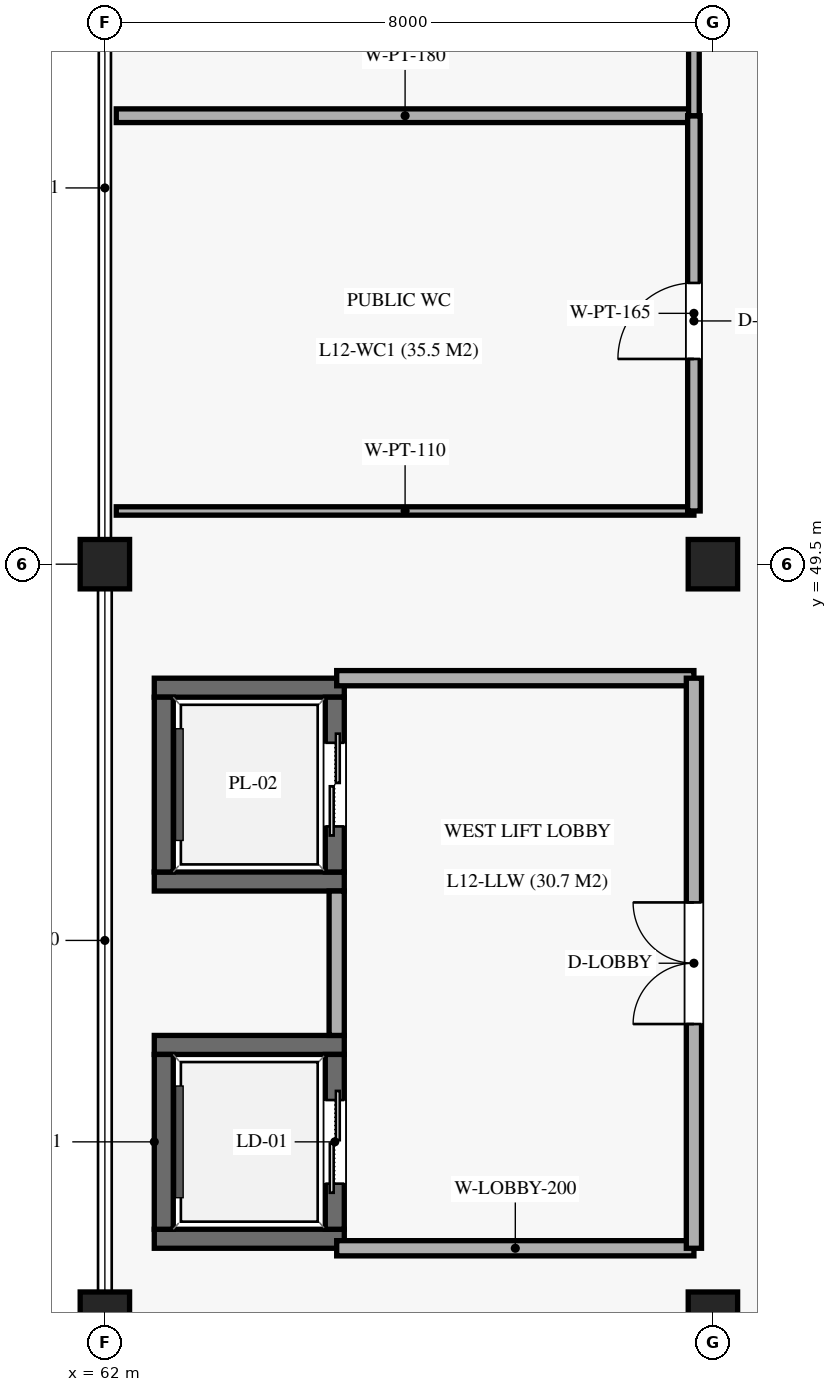
"""IFC4 building model, lengths in metres.
Left out: names, types, materials, properties, quantities, classifications, styles, units other than length and angle.
Written with IfcOpenShell. Run it as: python <this file> out.ifc"""

import sys

from ifc_helpers import new_model, si_unit, direction, frame, frame_2d, origin, origin_2d, place, context, subcontext, project, spatial, rectangle, extrude, element, fill, save


model = new_model("IFC4")
c1 = context("Model", 3, precision=1e-05, world=origin(), true_north=direction((0.0, 1.0)))
c2 = subcontext(c1, "Body", "Model", "MODEL_VIEW")
j1 = project(units=[si_unit("LENGTHUNIT", "METRE"), si_unit("PLANEANGLEUNIT", "RADIAN")], contexts=[c1])
p1 = place(None, origin())
s1 = spatial("IfcSite", under=j1, at=p1, CompositionType="ELEMENT")
p2 = place(p1, origin())
s2 = spatial("IfcBuilding", under=s1, at=p2, CompositionType="ELEMENT")
p3 = place(p2, frame((0.0, 0.0, 62.22)))
s3 = spatial("IfcBuildingStorey", under=s2, at=p3, CompositionType="ELEMENT", Elevation=62.22)
for number, where, z_axis, x_axis in (
    (1, (62.0, 39.6, 0.0), (0.0, 0.0, 1.0), (1.0, 0.0, 0.0)),
    (2, (62.0, 49.5, 0.0), (0.0, 0.0, 1.0), (1.0, 0.0, 0.0)),
    (3, (70.0, 39.6, 0.0), (0.0, 0.0, 1.0), (1.0, 0.0, 0.0)),
    (4, (70.0, 49.5, 0.0), (0.0, 0.0, 1.0), (1.0, 0.0, 0.0)),
):
    element("IfcColumn", number, at=place(p3, frame(where, z_axis=z_axis, x_axis=x_axis)), inside=s3, PredefinedType="COLUMN", context=c2, shape_type="SweptSolid", body=[
        extrude(rectangle(XDim=0.65, YDim=0.65, at=origin_2d()), origin(), (0.0, 0.0, 1.0), 4.08),
    ])
for number, where, z_axis, x_axis in (
    (5, (62.65, 40.625, 0.0), (0.0, 0.0, 1.0), (1.0, 0.0, 0.0)),
    (6, (62.65, 43.175, 0.0), (0.0, 0.0, 1.0), (1.0, 0.0, 0.0)),
):
    element("IfcWall", number, at=place(p3, frame(where, z_axis=z_axis, x_axis=x_axis)), inside=s3, PredefinedType="SOLIDWALL", context=c2, shape_type="SweptSolid", body=[
        extrude(rectangle(XDim=2.5, YDim=0.25, at=frame_2d((1.25, 0.0))), origin(), (0.0, 0.0, 1.0), 3.83),
    ])
p4 = place(p3, frame((62.775, 40.75, 0.0), z_axis=(0.0, 0.0, 1.0), x_axis=(0.0, 1.0, 0.0)))
e7 = element("IfcWall", 7, at=p4, inside=s3, PredefinedType="SOLIDWALL", context=c2, shape_type="SweptSolid", body=[
    extrude(rectangle(XDim=2.3, YDim=0.25, at=frame_2d((1.15, 0.0))), origin(), (0.0, 0.0, 1.0), 3.83),
])
p5 = place(p3, frame((65.025, 40.75, 0.0), z_axis=(0.0, 0.0, 1.0), x_axis=(0.0, 1.0, 0.0)))
e8 = element("IfcWall", 8, at=p5, inside=s3, PredefinedType="SOLIDWALL", context=c2, shape_type="SweptSolid", body=[
    extrude(rectangle(XDim=2.3, YDim=0.25, at=frame_2d((1.15, 0.0))), origin(), (0.0, 0.0, 1.0), 3.83),
])
p6 = place(p5, frame((0.6, 0.0, 0.0)))
e9 = element("IfcOpeningElement", 9, at=p6, cuts=e8, PredefinedType="OPENING", context=c2, shape_type="SweptSolid", body=[
    extrude(rectangle(XDim=1.1, YDim=2.2, at=frame_2d((0.55, 1.1))), frame((0.0, 0.135, 0.0), z_axis=(0.0, -1.0, 0.0), x_axis=(1.0, 0.0, 0.0)), (0.0, 0.0, 1.0), 0.27),
])
for number, where, z_axis, x_axis in (
    (10, (62.65, 45.325, 0.0), (0.0, 0.0, 1.0), (1.0, 0.0, 0.0)),
    (11, (62.65, 47.875, 0.0), (0.0, 0.0, 1.0), (1.0, 0.0, 0.0)),
):
    element("IfcWall", number, at=place(p3, frame(where, z_axis=z_axis, x_axis=x_axis)), inside=s3, PredefinedType="SOLIDWALL", context=c2, shape_type="SweptSolid", body=[
        extrude(rectangle(XDim=2.5, YDim=0.25, at=frame_2d((1.25, 0.0))), origin(), (0.0, 0.0, 1.0), 3.83),
    ])
p7 = place(p3, frame((62.775, 45.45, 0.0), z_axis=(0.0, 0.0, 1.0), x_axis=(0.0, 1.0, 0.0)))
e12 = element("IfcWall", 12, at=p7, inside=s3, PredefinedType="SOLIDWALL", context=c2, shape_type="SweptSolid", body=[
    extrude(rectangle(XDim=2.3, YDim=0.25, at=frame_2d((1.15, 0.0))), origin(), (0.0, 0.0, 1.0), 3.83),
])
p8 = place(p3, frame((65.025, 45.45, 0.0), z_axis=(0.0, 0.0, 1.0), x_axis=(0.0, 1.0, 0.0)))
e13 = element("IfcWall", 13, at=p8, inside=s3, PredefinedType="SOLIDWALL", context=c2, shape_type="SweptSolid", body=[
    extrude(rectangle(XDim=2.3, YDim=0.25, at=frame_2d((1.15, 0.0))), origin(), (0.0, 0.0, 1.0), 3.83),
])
p9 = place(p8, frame((0.6, 0.0, 0.0)))
e14 = element("IfcOpeningElement", 14, at=p9, cuts=e13, PredefinedType="OPENING", context=c2, shape_type="SweptSolid", body=[
    extrude(rectangle(XDim=1.1, YDim=2.2, at=frame_2d((0.55, 1.1))), frame((0.0, 0.135, 0.0), z_axis=(0.0, -1.0, 0.0), x_axis=(1.0, 0.0, 0.0)), (0.0, 0.0, 1.0), 0.27),
])
for number, where, z_axis, x_axis in (
    (15, (65.05, 40.5, 0.0), (0.0, 0.0, 1.0), (1.0, 0.0, 0.0)),
    (16, (65.05, 48.0, 0.0), (0.0, 0.0, 1.0), (1.0, 0.0, 0.0)),
):
    element("IfcWall", number, at=place(p3, frame(where, z_axis=z_axis, x_axis=x_axis)), inside=s3, PredefinedType="SOLIDWALL", context=c2, shape_type="SweptSolid", body=[
        extrude(rectangle(XDim=4.7, YDim=0.2, at=frame_2d((2.35, 0.0))), origin(), (0.0, 0.0, 1.0), 2.97),
    ])
p10 = place(p3, frame((65.05, 43.3, 0.0), z_axis=(0.0, 0.0, 1.0), x_axis=(0.0, 1.0, 0.0)))
e17 = element("IfcWall", 17, at=p10, inside=s3, PredefinedType="SOLIDWALL", context=c2, shape_type="SweptSolid", body=[
    extrude(rectangle(XDim=1.9, YDim=0.2, at=frame_2d((0.95, 0.0))), origin(), (0.0, 0.0, 1.0), 2.97),
])
p11 = place(p3, frame((69.75, 40.5, 0.0), z_axis=(0.0, 0.0, 1.0), x_axis=(0.0, 1.0, 0.0)))
e18 = element("IfcWall", 18, at=p11, inside=s3, PredefinedType="SOLIDWALL", context=c2, shape_type="SweptSolid", body=[
    extrude(rectangle(XDim=7.5, YDim=0.2, at=frame_2d((3.75, 0.0))), origin(), (0.0, 0.0, 1.0), 2.97),
])
p12 = place(p11, frame((2.95, 0.0, 0.0)))
e19 = element("IfcOpeningElement", 19, at=p12, cuts=e18, PredefinedType="OPENING", context=c2, shape_type="SweptSolid", body=[
    extrude(rectangle(XDim=1.6, YDim=2.2, at=frame_2d((0.8, 1.1))), frame((0.0, 0.11, 0.0), z_axis=(0.0, -1.0, 0.0), x_axis=(1.0, 0.0, 0.0)), (0.0, 0.0, 1.0), 0.22),
])
p13 = place(p3, frame((62.15, 50.2, 0.0), z_axis=(0.0, 0.0, 1.0), x_axis=(1.0, 0.0, 0.0)))
e20 = element("IfcWall", 20, at=p13, inside=s3, PredefinedType="PARTITIONING", context=c2, shape_type="SweptSolid", body=[
    extrude(rectangle(XDim=7.6, YDim=0.11, at=frame_2d((3.8, 0.0))), origin(), (0.0, 0.0, 1.0), 2.97),
])
p14 = place(p3, frame((62.15, 55.4, 0.0), z_axis=(0.0, 0.0, 1.0), x_axis=(1.0, 0.0, 0.0)))
e21 = element("IfcWall", 21, at=p14, inside=s3, PredefinedType="PARTITIONING", context=c2, shape_type="SweptSolid", body=[
    extrude(rectangle(XDim=7.6, YDim=0.18, at=frame_2d((3.8, 0.0))), origin(), (0.0, 0.0, 1.0), 2.97),
])
p15 = place(p3, frame((69.75, 50.2, 0.0), z_axis=(0.0, 0.0, 1.0), x_axis=(0.0, 1.0, 0.0)))
e22 = element("IfcWall", 22, at=p15, inside=s3, PredefinedType="PARTITIONING", context=c2, shape_type="SweptSolid", body=[
    extrude(rectangle(XDim=5.2, YDim=0.165, at=frame_2d((2.6, 0.0))), origin(), (0.0, 0.0, 1.0), 2.97),
])
p16 = place(p15, frame((2.0, 0.0, 0.0)))
e23 = element("IfcOpeningElement", 23, at=p16, cuts=e22, PredefinedType="OPENING", context=c2, shape_type="SweptSolid", body=[
    extrude(rectangle(XDim=1.0, YDim=2.1, at=frame_2d((0.5, 1.05))), frame((0.0, 0.093, 0.0), z_axis=(0.0, -1.0, 0.0), x_axis=(1.0, 0.0, 0.0)), (0.0, 0.0, 1.0), 0.185),
])
p17 = place(p3, frame((69.75, 55.4, 0.0), z_axis=(0.0, 0.0, 1.0), x_axis=(0.0, 1.0, 0.0)))
e24 = element("IfcWall", 24, at=p17, inside=s3, PredefinedType="PARTITIONING", context=c2, shape_type="SweptSolid", body=[
    extrude(rectangle(XDim=3.5, YDim=0.14, at=frame_2d((1.75, 0.0))), origin(), (0.0, 0.0, 1.0), 2.97),
])
p18 = place(p17, frame((1.15, 0.0, 0.0)))
e25 = element("IfcOpeningElement", 25, at=p18, cuts=e24, PredefinedType="OPENING", context=c2, shape_type="SweptSolid", body=[
    extrude(rectangle(XDim=1.05, YDim=2.15, at=frame_2d((0.525, 1.075))), frame((0.0, 0.08, 0.0), z_axis=(0.0, -1.0, 0.0), x_axis=(1.0, 0.0, 0.0)), (0.0, 0.0, 1.0), 0.16),
])
p19 = place(p6, origin())
e26 = element("IfcDoor", 26, at=p19, inside=s3, OperationType="DOUBLE_DOOR_SLIDING", PredefinedType="DOOR", context=c2, shape_type="SweptSolid", body=[
    extrude(rectangle(XDim=1.1, YDim=2.2, at=frame_2d((0.55, 1.1))), frame((0.0, 0.025, 0.0), z_axis=(0.0, -1.0, 0.0), x_axis=(1.0, 0.0, 0.0)), (0.0, 0.0, 1.0), 0.05),
])
fill(e9, e26)
p20 = place(p9, origin())
e27 = element("IfcDoor", 27, at=p20, inside=s3, OperationType="DOUBLE_DOOR_SLIDING", PredefinedType="DOOR", context=c2, shape_type="SweptSolid", body=[
    extrude(rectangle(XDim=1.1, YDim=2.2, at=frame_2d((0.55, 1.1))), frame((0.0, 0.025, 0.0), z_axis=(0.0, -1.0, 0.0), x_axis=(1.0, 0.0, 0.0)), (0.0, 0.0, 1.0), 0.05),
])
fill(e14, e27)
p21 = place(p12, origin())
e28 = element("IfcDoor", 28, at=p21, inside=s3, OperationType="DOUBLE_DOOR_SINGLE_SWING", PredefinedType="DOOR", context=c2, shape_type="SweptSolid", body=[
    extrude(rectangle(XDim=1.6, YDim=2.2, at=frame_2d((0.8, 1.1))), frame((0.0, 0.025, 0.0), z_axis=(0.0, -1.0, 0.0), x_axis=(1.0, 0.0, 0.0)), (0.0, 0.0, 1.0), 0.05),
])
fill(e19, e28)
p22 = place(p16, origin())
e29 = element("IfcDoor", 29, at=p22, inside=s3, OperationType="SINGLE_SWING_LEFT", PredefinedType="DOOR", context=c2, shape_type="SweptSolid", body=[
    extrude(rectangle(XDim=1.0, YDim=2.1, at=frame_2d((0.5, 1.05))), frame((0.0, 0.025, 0.0), z_axis=(0.0, -1.0, 0.0), x_axis=(1.0, 0.0, 0.0)), (0.0, 0.0, 1.0), 0.05),
])
fill(e23, e29)
save(model, sys.argv[1])
